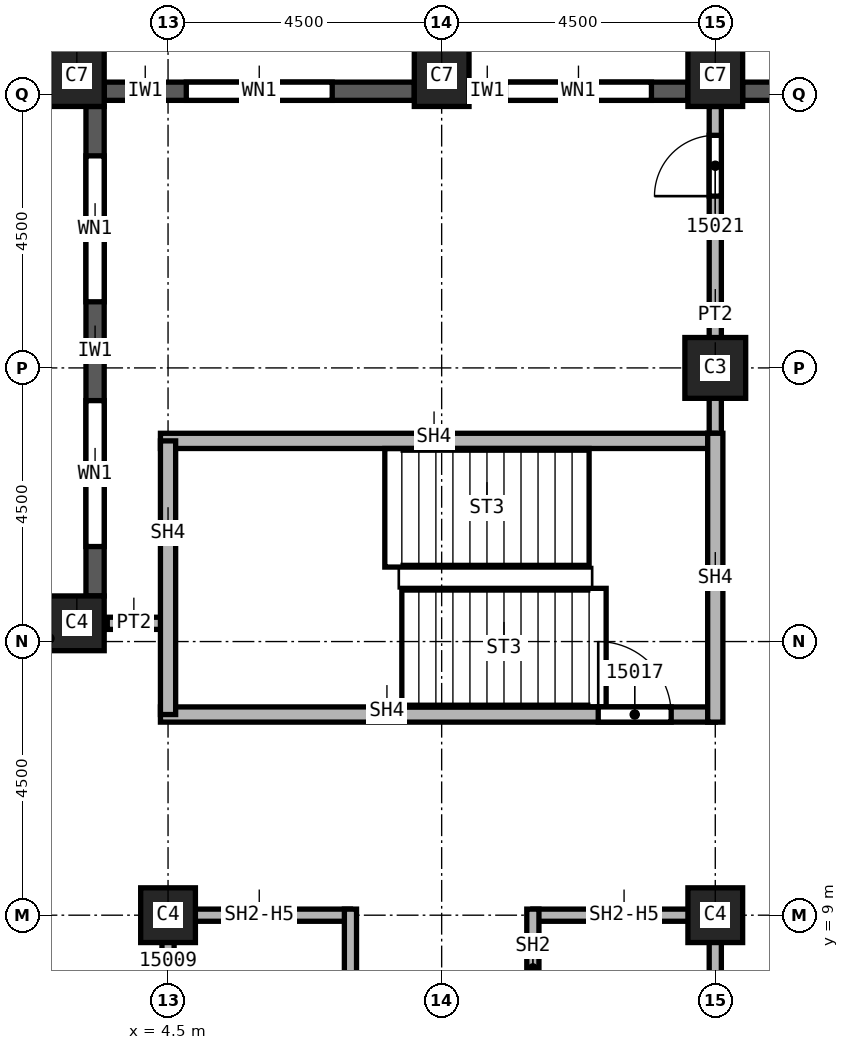
"""IFC4 building model, lengths in metres.
Left out: names, types, materials, properties, quantities, classifications, styles, units other than length and angle.
Written with IfcOpenShell. Run it as: python <this file> out.ifc"""

import sys

from ifc_helpers import new_model, si_unit, direction, frame, frame_2d, origin, origin_2d, place, context, subcontext, project, spatial, rectangle, extrude, element, fill, save


model = new_model("IFC4")
c1 = context("Model", 3, precision=1e-05, world=origin(), true_north=direction((0.0, 1.0)))
c2 = subcontext(c1, "Body", "Model", "MODEL_VIEW")
j1 = project(units=[si_unit("LENGTHUNIT", "METRE"), si_unit("PLANEANGLEUNIT", "RADIAN")], contexts=[c1])
p1 = place(None, origin())
s1 = spatial("IfcSite", under=j1, at=p1, CompositionType="ELEMENT")
p2 = place(p1, origin())
s2 = spatial("IfcBuilding", under=s1, at=p2, CompositionType="ELEMENT")
p3 = place(p2, frame((0.0, 0.0, 232.0)))
s3 = spatial("IfcBuildingStorey", under=s2, at=p3, CompositionType="ELEMENT", Elevation=232.0)
p4 = place(p3, frame((13.5, 18.0, 0.0), z_axis=(0.0, 0.0, 1.0), x_axis=(1.0, 0.0, 0.0)))
e1 = element("IfcColumn", 1, at=p4, inside=s3, PredefinedType="COLUMN", context=c2, shape_type="SweptSolid", body=[
    extrude(rectangle(XDim=1.0, YDim=1.0, at=origin_2d()), origin(), (0.0, 0.0, 1.0), 3.6),
])
for number, where, z_axis, x_axis in (
    (2, (4.5, 9.0, 0.0), (0.0, 0.0, 1.0), (1.0, 0.0, 0.0)),
    (3, (13.5, 9.0, 0.0), (0.0, 0.0, 1.0), (1.0, 0.0, 0.0)),
):
    element("IfcColumn", number, at=place(p3, frame(where, z_axis=z_axis, x_axis=x_axis)), inside=s3, PredefinedType="COLUMN", context=c2, shape_type="SweptSolid", body=[
        extrude(rectangle(XDim=0.9, YDim=0.9, at=origin_2d()), origin(), (0.0, 0.0, 1.0), 3.6),
    ])
for number, where, z_axis, x_axis in (
    (4, (3.0, 22.8, 0.0), (0.0, 0.0, 1.0), (1.0, 0.0, 0.0)),
    (5, (9.0, 22.8, 0.0), (0.0, 0.0, 1.0), (1.0, 0.0, 0.0)),
    (6, (13.5, 22.8, 0.0), (0.0, 0.0, 1.0), (1.0, 0.0, 0.0)),
):
    element("IfcColumn", number, at=place(p3, frame(where, z_axis=z_axis, x_axis=x_axis)), inside=s3, PredefinedType="COLUMN", context=c2, shape_type="SweptSolid", body=[
        extrude(rectangle(XDim=0.9, YDim=1.0, at=origin_2d()), origin(), (0.0, 0.0, 1.0), 3.6),
    ])
p5 = place(p3, frame((3.0, 13.8, 0.0), z_axis=(0.0, 0.0, 1.0), x_axis=(1.0, 0.0, 0.0)))
e7 = element("IfcColumn", 7, at=p5, inside=s3, PredefinedType="COLUMN", context=c2, shape_type="SweptSolid", body=[
    extrude(rectangle(XDim=0.9, YDim=0.9, at=origin_2d()), origin(), (0.0, 0.0, 1.0), 3.6),
])
p6 = place(p3, frame((17.55, 22.55, 0.0), z_axis=(0.0, 0.0, 1.0), x_axis=(-1.0, 0.0, 0.0)))
e8 = element("IfcWall", 8, at=p6, inside=s3, PredefinedType="SOLIDWALL", context=c2, shape_type="SweptSolid", body=[
    extrude(rectangle(XDim=3.6, YDim=0.3, at=frame_2d((1.8, 0.0))), origin(), (0.0, 0.0, 1.0), 3.0),
])
p7 = place(p6, frame((0.775, 0.0, 0.8)))
e9 = element("IfcOpeningElement", 9, at=p7, cuts=e8, PredefinedType="OPENING", context=c2, shape_type="SweptSolid", body=[
    extrude(rectangle(XDim=1.0, YDim=1.95, at=frame_2d((0.5, 0.975))), frame((0.0, 0.15, 0.0), z_axis=(0.0, -1.0, 0.0), x_axis=(1.0, 0.0, 0.0)), (0.0, 0.0, 1.0), 0.3),
])
p8 = place(p6, frame((2.375, 0.0, 0.8)))
e10 = element("IfcOpeningElement", 10, at=p8, cuts=e8, PredefinedType="OPENING", context=c2, shape_type="SweptSolid", body=[
    extrude(rectangle(XDim=0.6, YDim=1.95, at=frame_2d((0.3, 0.975))), frame((0.0, 0.15, 0.0), z_axis=(0.0, -1.0, 0.0), x_axis=(1.0, 0.0, 0.0)), (0.0, 0.0, 1.0), 0.3),
])
p9 = place(p3, frame((13.05, 22.55, 0.0), z_axis=(0.0, 0.0, 1.0), x_axis=(-1.0, 0.0, 0.0)))
e11 = element("IfcWall", 11, at=p9, inside=s3, PredefinedType="SOLIDWALL", context=c2, shape_type="SweptSolid", body=[
    extrude(rectangle(XDim=3.6, YDim=0.3, at=frame_2d((1.8, 0.0))), origin(), (0.0, 0.0, 1.0), 3.0),
])
p10 = place(p9, frame((0.6, 0.0, 0.8)))
e12 = element("IfcOpeningElement", 12, at=p10, cuts=e11, PredefinedType="OPENING", context=c2, shape_type="SweptSolid", body=[
    extrude(rectangle(XDim=2.4, YDim=1.95, at=frame_2d((1.2, 0.975))), frame((0.0, 0.15, 0.0), z_axis=(0.0, -1.0, 0.0), x_axis=(1.0, 0.0, 0.0)), (0.0, 0.0, 1.0), 0.3),
])
p11 = place(p3, frame((8.55, 22.55, 0.0), z_axis=(0.0, 0.0, 1.0), x_axis=(-1.0, 0.0, 0.0)))
e13 = element("IfcWall", 13, at=p11, inside=s3, PredefinedType="SOLIDWALL", context=c2, shape_type="SweptSolid", body=[
    extrude(rectangle(XDim=5.1, YDim=0.3, at=frame_2d((2.55, 0.0))), origin(), (0.0, 0.0, 1.0), 3.0),
])
p12 = place(p11, frame((1.35, 0.0, 0.8)))
e14 = element("IfcOpeningElement", 14, at=p12, cuts=e13, PredefinedType="OPENING", context=c2, shape_type="SweptSolid", body=[
    extrude(rectangle(XDim=2.4, YDim=1.95, at=frame_2d((1.2, 0.975))), frame((0.0, 0.15, 0.0), z_axis=(0.0, -1.0, 0.0), x_axis=(1.0, 0.0, 0.0)), (0.0, 0.0, 1.0), 0.3),
])
p13 = place(p3, frame((3.3, 22.3, 0.0), z_axis=(0.0, 0.0, 1.0), x_axis=(0.0, -1.0, 0.0)))
e15 = element("IfcWall", 15, at=p13, inside=s3, PredefinedType="SOLIDWALL", context=c2, shape_type="SweptSolid", body=[
    extrude(rectangle(XDim=8.05, YDim=0.3, at=frame_2d((4.025, 0.0))), origin(), (0.0, 0.0, 1.0), 3.0),
])
p14 = place(p13, frame((0.812, 0.0, 0.8)))
e16 = element("IfcOpeningElement", 16, at=p14, cuts=e15, PredefinedType="OPENING", context=c2, shape_type="SweptSolid", body=[
    extrude(rectangle(XDim=2.4, YDim=1.95, at=frame_2d((1.2, 0.975))), frame((0.0, 0.15, 0.0), z_axis=(0.0, -1.0, 0.0), x_axis=(1.0, 0.0, 0.0)), (0.0, 0.0, 1.0), 0.3),
])
p15 = place(p13, frame((4.837, 0.0, 0.8)))
e17 = element("IfcOpeningElement", 17, at=p15, cuts=e15, PredefinedType="OPENING", context=c2, shape_type="SweptSolid", body=[
    extrude(rectangle(XDim=2.4, YDim=1.95, at=frame_2d((1.2, 0.975))), frame((0.0, 0.15, 0.0), z_axis=(0.0, -1.0, 0.0), x_axis=(1.0, 0.0, 0.0)), (0.0, 0.0, 1.0), 0.3),
])
p16 = place(p3, frame((3.5, 13.8, 0.0), z_axis=(0.0, 0.0, 1.0), x_axis=(1.0, 0.0, 0.0)))
e18 = element("IfcWall", 18, at=p16, inside=s3, PredefinedType="PARTITIONING", context=c2, shape_type="SweptSolid", body=[
    extrude(rectangle(XDim=0.999, YDim=0.2, at=frame_2d((0.5, 0.0))), origin(), (0.0, 0.0, 1.0), 3.6),
])
p17 = place(p3, frame((13.5, 16.675, 0.0), z_axis=(0.0, 0.0, 1.0), x_axis=(0.0, 1.0, 0.0)))
e19 = element("IfcWall", 19, at=p17, inside=s3, PredefinedType="PARTITIONING", context=c2, shape_type="SweptSolid", body=[
    extrude(rectangle(XDim=5.625, YDim=0.2, at=frame_2d((2.812, 0.0))), origin(), (0.0, 0.0, 1.0), 3.6),
])
p18 = place(p17, frame((4.15, 0.0, 0.0)))
e20 = element("IfcOpeningElement", 20, at=p18, cuts=e19, PredefinedType="OPENING", context=c2, shape_type="SweptSolid", body=[
    extrude(rectangle(XDim=1.0, YDim=2.1, at=frame_2d((0.5, 1.05))), frame((0.0, 0.1, 0.0), z_axis=(0.0, -1.0, 0.0), x_axis=(1.0, 0.0, 0.0)), (0.0, 0.0, 1.0), 0.2),
])
p19 = place(p3, frame((4.5, 0.0, 0.0), z_axis=(0.0, 0.0, 1.0), x_axis=(0.0, 1.0, 0.0)))
e21 = element("IfcWall", 21, at=p19, inside=s3, PredefinedType="SOLIDWALL", context=c2, shape_type="SweptSolid", body=[
    extrude(rectangle(XDim=9.1, YDim=0.2, at=frame_2d((4.55, 0.0))), origin(), (0.0, 0.0, 1.0), 2.838),
])
p20 = place(p19, frame((6.7, 0.0, 0.0)))
e22 = element("IfcOpeningElement", 22, at=p20, cuts=e21, PredefinedType="OPENING", context=c2, shape_type="SweptSolid", body=[
    extrude(rectangle(XDim=1.1, YDim=2.1, at=frame_2d((0.55, 1.05))), frame((0.0, 0.1, 0.0), z_axis=(0.0, -1.0, 0.0), x_axis=(1.0, 0.0, 0.0)), (0.0, 0.0, 1.0), 0.2),
])
p21 = place(p3, frame((4.5, 9.0, 0.0), z_axis=(0.0, 0.0, 1.0), x_axis=(1.0, 0.0, 0.0)))
e23 = element("IfcWall", 23, at=p21, inside=s3, PredefinedType="SOLIDWALL", context=c2, shape_type="SweptSolid", body=[
    extrude(rectangle(XDim=3.0, YDim=0.2, at=frame_2d((1.5, 0.0))), origin(), (0.0, 0.0, 1.0), 2.838),
])
p22 = place(p3, frame((7.5, 9.1, 0.0), z_axis=(0.0, 0.0, 1.0), x_axis=(0.0, -1.0, 0.0)))
e24 = element("IfcWall", 24, at=p22, inside=s3, PredefinedType="SOLIDWALL", context=c2, shape_type="SweptSolid", body=[
    extrude(rectangle(XDim=6.225, YDim=0.2, at=frame_2d((3.113, 0.0))), origin(), (0.0, 0.0, 1.0), 3.6),
])
p23 = place(p3, frame((10.5, 9.0, 0.0), z_axis=(0.0, 0.0, 1.0), x_axis=(1.0, 0.0, 0.0)))
e25 = element("IfcWall", 25, at=p23, inside=s3, PredefinedType="SOLIDWALL", context=c2, shape_type="SweptSolid", body=[
    extrude(rectangle(XDim=3.0, YDim=0.2, at=frame_2d((1.5, 0.0))), origin(), (0.0, 0.0, 1.0), 2.838),
])
p24 = place(p3, frame((10.5, 9.1, 0.0), z_axis=(0.0, 0.0, 1.0), x_axis=(0.0, -1.0, 0.0)))
e26 = element("IfcWall", 26, at=p24, inside=s3, PredefinedType="SOLIDWALL", context=c2, shape_type="SweptSolid", body=[
    extrude(rectangle(XDim=3.225, YDim=0.2, at=frame_2d((1.613, 0.0))), origin(), (0.0, 0.0, 1.0), 3.6),
])
p25 = place(p24, frame((1.75, 0.0, 0.0)))
e27 = element("IfcOpeningElement", 27, at=p25, cuts=e26, PredefinedType="OPENING", context=c2, shape_type="SweptSolid", body=[
    extrude(rectangle(XDim=1.1, YDim=2.1, at=frame_2d((0.55, 1.05))), frame((0.0, 0.1, 0.0), z_axis=(0.0, -1.0, 0.0), x_axis=(1.0, 0.0, 0.0)), (0.0, 0.0, 1.0), 0.2),
])
p26 = place(p3, frame((13.5, 9.1, 0.0), z_axis=(0.0, 0.0, 1.0), x_axis=(0.0, -1.0, 0.0)))
e28 = element("IfcWall", 28, at=p26, inside=s3, PredefinedType="SOLIDWALL", context=c2, shape_type="SweptSolid", body=[
    extrude(rectangle(XDim=3.1, YDim=0.2, at=frame_2d((1.55, 0.0))), origin(), (0.0, 0.0, 1.0), 2.838),
])
p27 = place(p3, frame((4.375, 12.3, 0.0), z_axis=(0.0, 0.0, 1.0), x_axis=(1.0, 0.0, 0.0)))
e29 = element("IfcWall", 29, at=p27, inside=s3, PredefinedType="SOLIDWALL", context=c2, shape_type="SweptSolid", body=[
    extrude(rectangle(XDim=9.125, YDim=0.25, at=frame_2d((4.562, 0.0))), origin(), (0.0, 0.0, 1.0), 3.6),
])
p28 = place(p27, frame((7.2, 0.0, 0.0)))
e30 = element("IfcOpeningElement", 30, at=p28, cuts=e29, PredefinedType="OPENING", context=c2, shape_type="SweptSolid", body=[
    extrude(rectangle(XDim=1.2, YDim=2.1, at=frame_2d((0.6, 1.05))), frame((0.0, 0.125, 0.0), z_axis=(0.0, -1.0, 0.0), x_axis=(1.0, 0.0, 0.0)), (0.0, 0.0, 1.0), 0.25),
])
p29 = place(p3, frame((4.375, 16.8, 0.0), z_axis=(0.0, 0.0, 1.0), x_axis=(1.0, 0.0, 0.0)))
e31 = element("IfcWall", 31, at=p29, inside=s3, PredefinedType="SOLIDWALL", context=c2, shape_type="SweptSolid", body=[
    extrude(rectangle(XDim=9.125, YDim=0.25, at=frame_2d((4.562, 0.0))), origin(), (0.0, 0.0, 1.0), 3.6),
])
p30 = place(p3, frame((4.5, 12.3, 0.0), z_axis=(0.0, 0.0, 1.0), x_axis=(0.0, 1.0, 0.0)))
e32 = element("IfcWall", 32, at=p30, inside=s3, PredefinedType="SOLIDWALL", context=c2, shape_type="SweptSolid", body=[
    extrude(rectangle(XDim=4.5, YDim=0.25, at=frame_2d((2.25, 0.0))), origin(), (0.0, 0.0, 1.0), 3.6),
])
p31 = place(p3, frame((13.5, 12.175, 0.0), z_axis=(0.0, 0.0, 1.0), x_axis=(0.0, 1.0, 0.0)))
e33 = element("IfcWall", 33, at=p31, inside=s3, PredefinedType="SOLIDWALL", context=c2, shape_type="SweptSolid", body=[
    extrude(rectangle(XDim=4.75, YDim=0.25, at=frame_2d((2.375, 0.0))), origin(), (0.0, 0.0, 1.0), 3.6),
])
p32 = place(p10, origin())
e34 = element("IfcWindow", 34, at=p32, inside=s3, PartitioningType="SINGLE_PANEL", PredefinedType="WINDOW", context=c2, shape_type="SweptSolid", body=[
    extrude(rectangle(XDim=2.4, YDim=1.95, at=frame_2d((1.2, 0.975))), frame((0.0, 0.03, 0.0), z_axis=(0.0, -1.0, 0.0), x_axis=(1.0, 0.0, 0.0)), (0.0, 0.0, 1.0), 0.06),
])
fill(e12, e34)
p33 = place(p12, origin())
e35 = element("IfcWindow", 35, at=p33, inside=s3, PartitioningType="SINGLE_PANEL", PredefinedType="WINDOW", context=c2, shape_type="SweptSolid", body=[
    extrude(rectangle(XDim=2.4, YDim=1.95, at=frame_2d((1.2, 0.975))), frame((0.0, 0.03, 0.0), z_axis=(0.0, -1.0, 0.0), x_axis=(1.0, 0.0, 0.0)), (0.0, 0.0, 1.0), 0.06),
])
fill(e14, e35)
p34 = place(p14, origin())
e36 = element("IfcWindow", 36, at=p34, inside=s3, PartitioningType="SINGLE_PANEL", PredefinedType="WINDOW", context=c2, shape_type="SweptSolid", body=[
    extrude(rectangle(XDim=2.4, YDim=1.95, at=frame_2d((1.2, 0.975))), frame((0.0, 0.03, 0.0), z_axis=(0.0, -1.0, 0.0), x_axis=(1.0, 0.0, 0.0)), (0.0, 0.0, 1.0), 0.06),
])
fill(e16, e36)
p35 = place(p15, origin())
e37 = element("IfcWindow", 37, at=p35, inside=s3, PartitioningType="SINGLE_PANEL", PredefinedType="WINDOW", context=c2, shape_type="SweptSolid", body=[
    extrude(rectangle(XDim=2.4, YDim=1.95, at=frame_2d((1.2, 0.975))), frame((0.0, 0.03, 0.0), z_axis=(0.0, -1.0, 0.0), x_axis=(1.0, 0.0, 0.0)), (0.0, 0.0, 1.0), 0.06),
])
fill(e17, e37)
p36 = place(p28, origin())
e38 = element("IfcDoor", 38, at=p36, inside=s3, OperationType="SINGLE_SWING_RIGHT", PredefinedType="DOOR", context=c2, shape_type="SweptSolid", body=[
    extrude(rectangle(XDim=1.2, YDim=2.1, at=frame_2d((0.6, 1.05))), frame((0.0, 0.025, 0.0), z_axis=(0.0, -1.0, 0.0), x_axis=(1.0, 0.0, 0.0)), (0.0, 0.0, 1.0), 0.05),
])
fill(e30, e38)
p37 = place(p18, origin())
e39 = element("IfcDoor", 39, at=p37, inside=s3, OperationType="SINGLE_SWING_RIGHT", PredefinedType="DOOR", context=c2, shape_type="SweptSolid", body=[
    extrude(rectangle(XDim=1.0, YDim=2.1, at=frame_2d((0.5, 1.05))), frame((0.0, 0.025, 0.0), z_axis=(0.0, -1.0, 0.0), x_axis=(1.0, 0.0, 0.0)), (0.0, 0.0, 1.0), 0.05),
])
fill(e20, e39)
save(model, sys.argv[1])
